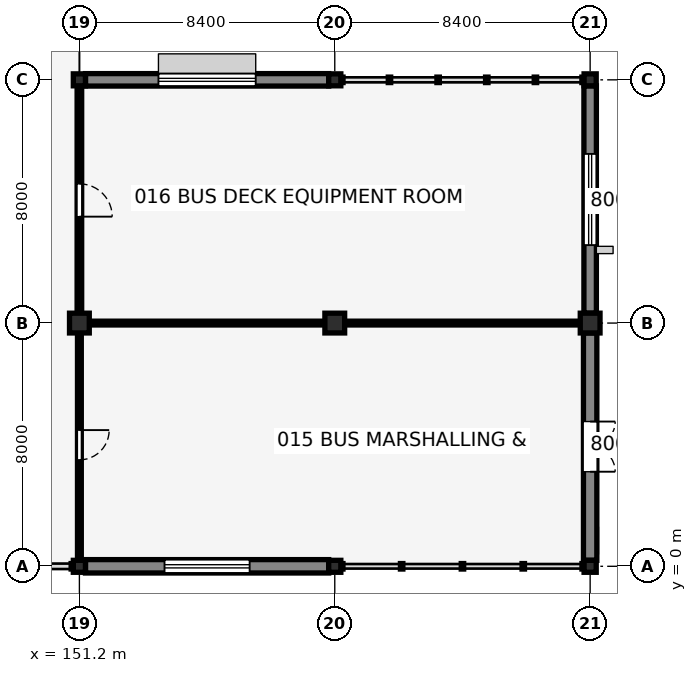
"""IFC4 building model, lengths in metres.
Left out: names, types, materials, properties, quantities, classifications, styles, units other than length and angle.
Written with IfcOpenShell. Run it as: python <this file> out.ifc"""

import sys

from ifc_helpers import new_model, si_unit, direction, frame, frame_2d, origin, origin_2d, place, context, subcontext, project, spatial, rectangle, circle, i_section, extrude, element, fill, save


model = new_model("IFC4")
c1 = context("Model", 3, precision=1e-05, world=origin(), true_north=direction((0.0, 1.0)))
c2 = subcontext(c1, "Body", "Model", "MODEL_VIEW")
j1 = project(units=[si_unit("LENGTHUNIT", "METRE"), si_unit("PLANEANGLEUNIT", "RADIAN")], contexts=[c1])
p1 = place(None, origin())
s1 = spatial("IfcSite", under=j1, at=p1, CompositionType="ELEMENT")
p2 = place(p1, origin())
s2 = spatial("IfcBuilding", under=s1, at=p2, CompositionType="ELEMENT")
p3 = place(p2, origin())
s3 = spatial("IfcBuildingStorey", under=s2, at=p3, CompositionType="ELEMENT", Elevation=0.0)
p4 = place(p3, frame((151.2, 0.0, 0.0), z_axis=(0.0, 0.0, 1.0), x_axis=(1.0, 0.0, 0.0)))
e1 = element("IfcColumn", 1, at=p4, inside=s3, PredefinedType="COLUMN", context=c2, shape_type="SweptSolid", body=[
    extrude(i_section(OverallWidth=0.399, OverallDepth=0.394, WebThickness=0.023, FlangeThickness=0.037, FilletRadius=0.015, at=origin_2d()), origin(), (0.0, 0.0, 1.0), 5.15),
])
p5 = place(p3, frame((151.2, 8.0, 0.0), z_axis=(0.0, 0.0, 1.0), x_axis=(1.0, 0.0, 0.0)))
e2 = element("IfcColumn", 2, at=p5, inside=s3, PredefinedType="COLUMN", context=c2, shape_type="SweptSolid", body=[
    extrude(circle(Radius=0.325, at=origin_2d()), origin(), (0.0, 0.0, 1.0), 5.15),
])
for number, where, z_axis, x_axis in (
    (3, (151.2, 16.0, 0.0), (0.0, 0.0, 1.0), (1.0, 0.0, 0.0)),
    (4, (159.6, 0.0, 0.0), (0.0, 0.0, 1.0), (1.0, 0.0, 0.0)),
):
    element("IfcColumn", number, at=place(p3, frame(where, z_axis=z_axis, x_axis=x_axis)), inside=s3, PredefinedType="COLUMN", context=c2, shape_type="SweptSolid", body=[
        extrude(i_section(OverallWidth=0.399, OverallDepth=0.394, WebThickness=0.023, FlangeThickness=0.037, FilletRadius=0.015, at=origin_2d()), origin(), (0.0, 0.0, 1.0), 5.15),
    ])
p6 = place(p3, frame((159.6, 8.0, 0.0), z_axis=(0.0, 0.0, 1.0), x_axis=(1.0, 0.0, 0.0)))
e5 = element("IfcColumn", 5, at=p6, inside=s3, PredefinedType="COLUMN", context=c2, shape_type="SweptSolid", body=[
    extrude(circle(Radius=0.325, at=origin_2d()), origin(), (0.0, 0.0, 1.0), 5.15),
])
for number, where, z_axis, x_axis in (
    (6, (159.6, 16.0, 0.0), (0.0, 0.0, 1.0), (1.0, 0.0, 0.0)),
    (7, (168.0, 0.0, 0.0), (0.0, 0.0, 1.0), (1.0, 0.0, 0.0)),
):
    element("IfcColumn", number, at=place(p3, frame(where, z_axis=z_axis, x_axis=x_axis)), inside=s3, PredefinedType="COLUMN", context=c2, shape_type="SweptSolid", body=[
        extrude(i_section(OverallWidth=0.399, OverallDepth=0.394, WebThickness=0.023, FlangeThickness=0.037, FilletRadius=0.015, at=origin_2d()), origin(), (0.0, 0.0, 1.0), 5.15),
    ])
p7 = place(p3, frame((168.0, 8.0, 0.0), z_axis=(0.0, 0.0, 1.0), x_axis=(1.0, 0.0, 0.0)))
e8 = element("IfcColumn", 8, at=p7, inside=s3, PredefinedType="COLUMN", context=c2, shape_type="SweptSolid", body=[
    extrude(circle(Radius=0.325, at=origin_2d()), origin(), (0.0, 0.0, 1.0), 5.15),
])
p8 = place(p3, frame((168.0, 16.0, 0.0), z_axis=(0.0, 0.0, 1.0), x_axis=(1.0, 0.0, 0.0)))
e9 = element("IfcColumn", 9, at=p8, inside=s3, PredefinedType="COLUMN", context=c2, shape_type="SweptSolid", body=[
    extrude(i_section(OverallWidth=0.399, OverallDepth=0.394, WebThickness=0.023, FlangeThickness=0.037, FilletRadius=0.015, at=origin_2d()), origin(), (0.0, 0.0, 1.0), 5.15),
])
p9 = place(p3, frame((151.399, 16.0, 0.0), z_axis=(0.0, 0.0, 1.0), x_axis=(1.0, 0.0, 0.0)))
e10 = element("IfcWall", 10, at=p9, inside=s3, PredefinedType="SOLIDWALL", context=c2, shape_type="SweptSolid", body=[
    extrude(rectangle(XDim=8.001, YDim=0.41, at=frame_2d((4.0, 0.0))), origin(), (0.0, 0.0, 1.0), 4.74),
])
p10 = place(p9, frame((2.4, 0.0, 0.9), z_axis=(0.0, 0.0, 1.0), x_axis=(1.0, 0.0, 0.0)))
e11 = element("IfcOpeningElement", 11, at=p10, cuts=e10, PredefinedType="OPENING", context=c2, shape_type="SweptSolid", body=[
    extrude(rectangle(XDim=3.2, YDim=1.65, at=frame_2d((1.6, 0.825))), frame((0.0, 0.215, 0.0), z_axis=(0.0, -1.0, 0.0), x_axis=(1.0, 0.0, 0.0)), (0.0, 0.0, 1.0), 0.43),
])
p11 = place(p3, frame((168.0, 0.197, 0.0), z_axis=(0.0, 0.0, 1.0), x_axis=(0.0, 1.0, 0.0)))
e12 = element("IfcWall", 12, at=p11, inside=s3, PredefinedType="SOLIDWALL", context=c2, shape_type="SweptSolid", body=[
    extrude(rectangle(XDim=7.478, YDim=0.44, at=frame_2d((3.739, 0.0))), origin(), (0.0, 0.0, 1.0), 4.747),
])
p12 = place(p11, frame((4.564, 0.0, 0.0), z_axis=(0.0, 0.0, 1.0), x_axis=(-1.0, 0.0, 0.0)))
e13 = element("IfcOpeningElement", 13, at=p12, cuts=e12, PredefinedType="OPENING", context=c2, shape_type="SweptSolid", body=[
    extrude(rectangle(XDim=1.65, YDim=2.3, at=frame_2d((0.825, 1.15))), frame((0.0, 0.23, 0.0), z_axis=(0.0, -1.0, 0.0), x_axis=(1.0, 0.0, 0.0)), (0.0, 0.0, 1.0), 0.46),
])
p13 = place(p3, frame((168.0, 8.325, 0.0), z_axis=(0.0, 0.0, 1.0), x_axis=(0.0, 1.0, 0.0)))
e14 = element("IfcWall", 14, at=p13, inside=s3, PredefinedType="SOLIDWALL", context=c2, shape_type="SweptSolid", body=[
    extrude(rectangle(XDim=7.478, YDim=0.41, at=frame_2d((3.739, 0.0))), origin(), (0.0, 0.0, 1.0), 4.747),
])
p14 = place(p13, frame((2.239, 0.0, 0.9), z_axis=(0.0, 0.0, 1.0), x_axis=(1.0, 0.0, 0.0)))
e15 = element("IfcOpeningElement", 15, at=p14, cuts=e14, PredefinedType="OPENING", context=c2, shape_type="SweptSolid", body=[
    extrude(rectangle(XDim=3.0, YDim=1.65, at=frame_2d((1.5, 0.825))), frame((0.0, 0.215, 0.0), z_axis=(0.0, -1.0, 0.0), x_axis=(1.0, 0.0, 0.0)), (0.0, 0.0, 1.0), 0.43),
])
p15 = place(p3, frame((151.399, 0.0, 0.0), z_axis=(0.0, 0.0, 1.0), x_axis=(1.0, 0.0, 0.0)))
e16 = element("IfcWall", 16, at=p15, inside=s3, PredefinedType="SOLIDWALL", context=c2, shape_type="SweptSolid", body=[
    extrude(rectangle(XDim=8.001, YDim=0.44, at=frame_2d((4.0, 0.0))), origin(), (0.0, 0.0, 1.0), 4.74),
])
p16 = place(p15, frame((2.601, 0.0, 0.9), z_axis=(0.0, 0.0, 1.0), x_axis=(1.0, 0.0, 0.0)))
e17 = element("IfcOpeningElement", 17, at=p16, cuts=e16, PredefinedType="OPENING", context=c2, shape_type="SweptSolid", body=[
    extrude(rectangle(XDim=2.8, YDim=1.6, at=frame_2d((1.4, 0.8))), frame((0.0, 0.23, 0.0), z_axis=(0.0, -1.0, 0.0), x_axis=(1.0, 0.0, 0.0)), (0.0, 0.0, 1.0), 0.46),
])
p17 = place(p3, frame((151.2, 0.187, 0.0), z_axis=(0.0, 0.0, 1.0), x_axis=(0.0, 1.0, 0.0)))
e18 = element("IfcWall", 18, at=p17, inside=s3, PredefinedType="PARTITIONING", context=c2, shape_type="SweptSolid", body=[
    extrude(rectangle(XDim=7.498, YDim=0.125, at=frame_2d((3.749, 0.0))), origin(), (0.0, 0.0, 1.0), 4.542),
])
p18 = place(p17, frame((4.293, 0.0, 0.0), z_axis=(0.0, 0.0, 1.0), x_axis=(-1.0, 0.0, 0.0)))
e19 = element("IfcOpeningElement", 19, at=p18, cuts=e18, PredefinedType="OPENING", context=c2, shape_type="SweptSolid", body=[
    extrude(rectangle(XDim=0.98, YDim=2.15, at=frame_2d((0.49, 1.075))), frame((0.0, 0.073, 0.0), z_axis=(0.0, -1.0, 0.0), x_axis=(1.0, 0.0, 0.0)), (0.0, 0.0, 1.0), 0.145),
])
p19 = place(p3, frame((151.2, 8.315, 0.0), z_axis=(0.0, 0.0, 1.0), x_axis=(0.0, 1.0, 0.0)))
e20 = element("IfcWall", 20, at=p19, inside=s3, PredefinedType="PARTITIONING", context=c2, shape_type="SweptSolid", body=[
    extrude(rectangle(XDim=7.498, YDim=0.15, at=frame_2d((3.749, 0.0))), origin(), (0.0, 0.0, 1.0), 4.542),
])
p20 = place(p19, frame((4.265, 0.0, 0.0), z_axis=(0.0, 0.0, 1.0), x_axis=(-1.0, 0.0, 0.0)))
e21 = element("IfcOpeningElement", 21, at=p20, cuts=e20, PredefinedType="OPENING", context=c2, shape_type="SweptSolid", body=[
    extrude(rectangle(XDim=1.08, YDim=2.18, at=frame_2d((0.54, 1.09))), frame((0.0, 0.085, 0.0), z_axis=(0.0, -1.0, 0.0), x_axis=(1.0, 0.0, 0.0)), (0.0, 0.0, 1.0), 0.17),
])
for number, where, z_axis, x_axis in (
    (22, (151.515, 8.0, 0.0), (0.0, 0.0, 1.0), (1.0, 0.0, 0.0)),
    (23, (159.915, 8.0, 0.0), (0.0, 0.0, 1.0), (1.0, 0.0, 0.0)),
):
    element("IfcWall", number, at=place(p3, frame(where, z_axis=z_axis, x_axis=x_axis)), inside=s3, PredefinedType="PARTITIONING", context=c2, shape_type="SweptSolid", body=[
        extrude(rectangle(XDim=7.77, YDim=0.125, at=frame_2d((3.885, 0.0))), origin(), (0.0, 0.0, 1.0), 4.533),
    ])
p21 = place(p10, origin())
e24 = element("IfcWindow", 24, at=p21, inside=s3, PartitioningType="TRIPLE_PANEL_VERTICAL", PredefinedType="WINDOW", context=c2, shape_type="SweptSolid", body=[
    extrude(rectangle(XDim=3.2, YDim=1.65, at=frame_2d((1.6, 0.825))), frame((0.0, 0.03, 0.0), z_axis=(0.0, -1.0, 0.0), x_axis=(1.0, 0.0, 0.0)), (0.0, 0.0, 1.0), 0.06),
])
fill(e11, e24)
p22 = place(p12, origin())
e25 = element("IfcDoor", 25, at=p22, inside=s3, OperationType="DOUBLE_DOOR_SINGLE_SWING", PredefinedType="DOOR", context=c2, shape_type="SweptSolid", body=[
    extrude(rectangle(XDim=1.65, YDim=2.3, at=frame_2d((0.825, 1.15))), frame((0.0, 0.025, 0.0), z_axis=(0.0, -1.0, 0.0), x_axis=(1.0, 0.0, 0.0)), (0.0, 0.0, 1.0), 0.05),
])
fill(e13, e25)
p23 = place(p14, origin())
e26 = element("IfcWindow", 26, at=p23, inside=s3, PartitioningType="DOUBLE_PANEL_VERTICAL", PredefinedType="WINDOW", context=c2, shape_type="SweptSolid", body=[
    extrude(rectangle(XDim=3.0, YDim=1.65, at=frame_2d((1.5, 0.825))), frame((0.0, 0.03, 0.0), z_axis=(0.0, -1.0, 0.0), x_axis=(1.0, 0.0, 0.0)), (0.0, 0.0, 1.0), 0.06),
])
fill(e15, e26)
p24 = place(p16, origin())
e27 = element("IfcWindow", 27, at=p24, inside=s3, PartitioningType="DOUBLE_PANEL_VERTICAL", PredefinedType="WINDOW", context=c2, shape_type="SweptSolid", body=[
    extrude(rectangle(XDim=2.8, YDim=1.6, at=frame_2d((1.4, 0.8))), frame((0.0, 0.03, 0.0), z_axis=(0.0, -1.0, 0.0), x_axis=(1.0, 0.0, 0.0)), (0.0, 0.0, 1.0), 0.06),
])
fill(e17, e27)
p25 = place(p18, origin())
e28 = element("IfcDoor", 28, at=p25, inside=s3, OperationType="SINGLE_SWING_LEFT", PredefinedType="DOOR", context=c2, shape_type="SweptSolid", body=[
    extrude(rectangle(XDim=0.98, YDim=2.15, at=frame_2d((0.49, 1.075))), frame((0.0, 0.025, 0.0), z_axis=(0.0, -1.0, 0.0), x_axis=(1.0, 0.0, 0.0)), (0.0, 0.0, 1.0), 0.05),
])
fill(e19, e28)
p26 = place(p20, origin())
e29 = element("IfcDoor", 29, at=p26, inside=s3, OperationType="SINGLE_SWING_RIGHT", PredefinedType="DOOR", context=c2, shape_type="SweptSolid", body=[
    extrude(rectangle(XDim=1.08, YDim=2.18, at=frame_2d((0.54, 1.09))), frame((0.0, 0.025, 0.0), z_axis=(0.0, -1.0, 0.0), x_axis=(1.0, 0.0, 0.0)), (0.0, 0.0, 1.0), 0.05),
])
fill(e21, e29)
save(model, sys.argv[1])
